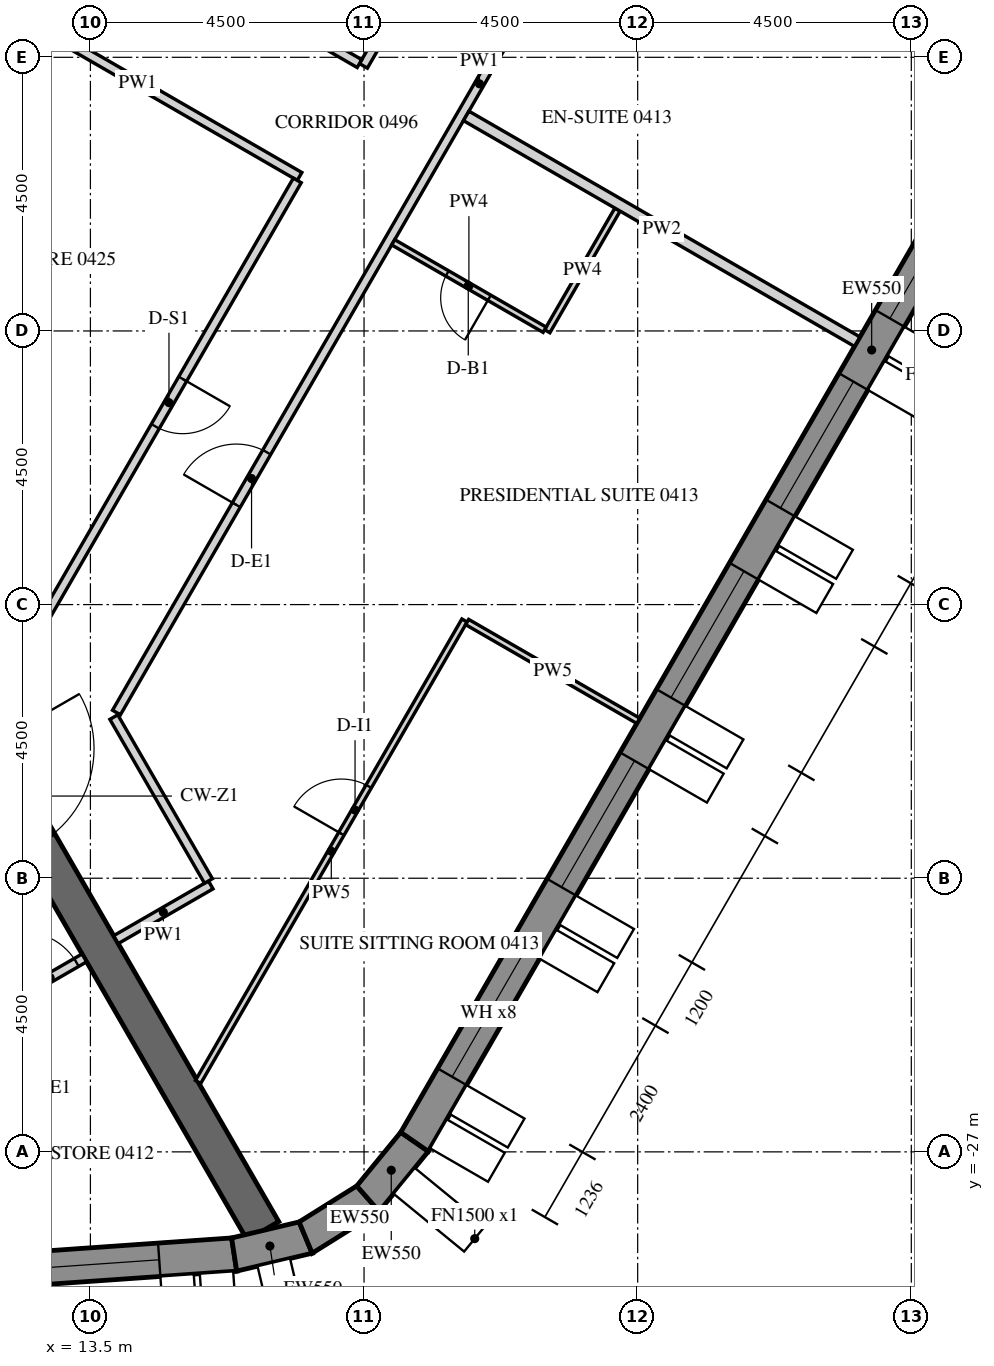
"""IFC4 building model, lengths in metres.
Left out: names, types, materials, properties, quantities, classifications, styles, units other than length and angle.
Written with IfcOpenShell. Run it as: python <this file> out.ifc"""

import sys

from ifc_helpers import new_model, si_unit, direction, frame, frame_2d, origin, place, context, subcontext, project, spatial, polyline, rectangle, outline, extrude, element, fill, save


model = new_model("IFC4")
c1 = context("Model", 3, precision=1e-05, world=origin(), true_north=direction((0.0, 1.0)))
c2 = subcontext(c1, "Body", "Model", "MODEL_VIEW")
j1 = project(units=[si_unit("LENGTHUNIT", "METRE"), si_unit("PLANEANGLEUNIT", "RADIAN")], contexts=[c1])
p1 = place(None, origin())
s1 = spatial("IfcSite", under=j1, at=p1, CompositionType="ELEMENT")
p2 = place(p1, origin())
s2 = spatial("IfcBuilding", under=s1, at=p2, CompositionType="ELEMENT")
p3 = place(p2, frame((0.0, 0.0, 68.7)))
s3 = spatial("IfcBuildingStorey", under=s2, at=p3, CompositionType="ELEMENT", Elevation=68.7)
p4 = place(p3, frame((-14.134, -30.786, -0.15), z_axis=(0.0, 0.0, 1.0), x_axis=(0.997564037441, 0.069756657061, 0.0)))
e1 = element("IfcWall", 1, at=p4, inside=s3, PredefinedType="SOLIDWALL", context=c2, shape_type="SweptSolid", body=[
    extrude(outline(polyline([(-0.026, -0.275), (30.094, -0.275), (30.049, 0.275), (0.026, 0.275), (-0.026, -0.275)])), origin(), (0.0, 0.0, 1.0), 3.9),
])
p5 = place(p4, frame((1.236, 0.0, 1.05)))
e2 = element("IfcOpeningElement", 2, at=p5, cuts=e1, PredefinedType="OPENING", context=c2, shape_type="SweptSolid", body=[
    extrude(rectangle(XDim=2.4, YDim=2.4, at=frame_2d((1.2, 1.2))), frame((0.0, 0.285, 0.0), z_axis=(0.0, -1.0, 0.0), x_axis=(1.0, 0.0, 0.0)), (0.0, 0.0, 1.0), 0.57),
])
p6 = place(p4, frame((4.835, 0.0, 1.05)))
e3 = element("IfcOpeningElement", 3, at=p6, cuts=e1, PredefinedType="OPENING", context=c2, shape_type="SweptSolid", body=[
    extrude(rectangle(XDim=2.4, YDim=2.4, at=frame_2d((1.2, 1.2))), frame((0.0, 0.285, 0.0), z_axis=(0.0, -1.0, 0.0), x_axis=(1.0, 0.0, 0.0)), (0.0, 0.0, 1.0), 0.57),
])
p7 = place(p4, frame((8.436, 0.0, 1.05)))
e4 = element("IfcOpeningElement", 4, at=p7, cuts=e1, PredefinedType="OPENING", context=c2, shape_type="SweptSolid", body=[
    extrude(rectangle(XDim=2.4, YDim=2.4, at=frame_2d((1.2, 1.2))), frame((0.0, 0.285, 0.0), z_axis=(0.0, -1.0, 0.0), x_axis=(1.0, 0.0, 0.0)), (0.0, 0.0, 1.0), 0.57),
])
p8 = place(p4, frame((12.035, 0.0, 1.05)))
e5 = element("IfcOpeningElement", 5, at=p8, cuts=e1, PredefinedType="OPENING", context=c2, shape_type="SweptSolid", body=[
    extrude(rectangle(XDim=2.4, YDim=2.4, at=frame_2d((1.2, 1.2))), frame((0.0, 0.285, 0.0), z_axis=(0.0, -1.0, 0.0), x_axis=(1.0, 0.0, 0.0)), (0.0, 0.0, 1.0), 0.57),
])
p9 = place(p4, frame((15.635, 0.0, 1.05)))
e6 = element("IfcOpeningElement", 6, at=p9, cuts=e1, PredefinedType="OPENING", context=c2, shape_type="SweptSolid", body=[
    extrude(rectangle(XDim=2.4, YDim=2.4, at=frame_2d((1.2, 1.2))), frame((0.0, 0.285, 0.0), z_axis=(0.0, -1.0, 0.0), x_axis=(1.0, 0.0, 0.0)), (0.0, 0.0, 1.0), 0.57),
])
p10 = place(p4, frame((19.236, 0.0, 1.05)))
e7 = element("IfcOpeningElement", 7, at=p10, cuts=e1, PredefinedType="OPENING", context=c2, shape_type="SweptSolid", body=[
    extrude(rectangle(XDim=2.4, YDim=2.4, at=frame_2d((1.2, 1.2))), frame((0.0, 0.285, 0.0), z_axis=(0.0, -1.0, 0.0), x_axis=(1.0, 0.0, 0.0)), (0.0, 0.0, 1.0), 0.57),
])
p11 = place(p4, frame((22.835, 0.0, 1.05)))
e8 = element("IfcOpeningElement", 8, at=p11, cuts=e1, PredefinedType="OPENING", context=c2, shape_type="SweptSolid", body=[
    extrude(rectangle(XDim=2.4, YDim=2.4, at=frame_2d((1.2, 1.2))), frame((0.0, 0.285, 0.0), z_axis=(0.0, -1.0, 0.0), x_axis=(1.0, 0.0, 0.0)), (0.0, 0.0, 1.0), 0.57),
])
p12 = place(p4, frame((26.436, 0.0, 1.05)))
e9 = element("IfcOpeningElement", 9, at=p12, cuts=e1, PredefinedType="OPENING", context=c2, shape_type="SweptSolid", body=[
    extrude(rectangle(XDim=2.4, YDim=2.4, at=frame_2d((1.2, 1.2))), frame((0.0, 0.285, 0.0), z_axis=(0.0, -1.0, 0.0), x_axis=(1.0, 0.0, 0.0)), (0.0, 0.0, 1.0), 0.57),
])
p13 = place(p3, frame((15.864, -28.688, -0.15), z_axis=(0.0, 0.0, 1.0), x_axis=(0.973063591128, 0.230536868247, 0.0)))
e10 = element("IfcWall", 10, at=p13, inside=s3, PredefinedType="SOLIDWALL", context=c2, shape_type="SweptSolid", body=[
    extrude(outline(polyline([(-0.022, -0.275), (1.253, -0.275), (1.163, 0.275), (0.022, 0.275), (-0.022, -0.275)])), origin(), (0.0, 0.0, 1.0), 3.9),
])
p14 = place(p3, frame((17.04, -28.41, -0.15), z_axis=(0.0, 0.0, 1.0), x_axis=(0.847952888306, 0.530071598195, 0.0)))
e11 = element("IfcWall", 11, at=p14, inside=s3, PredefinedType="SOLIDWALL", context=c2, shape_type="SweptSolid", body=[
    extrude(outline(polyline([(-0.045, -0.275), (1.253, -0.275), (1.163, 0.275), (0.045, 0.275), (-0.045, -0.275)])), origin(), (0.0, 0.0, 1.0), 3.9),
])
p15 = place(p3, frame((18.064, -27.769, -0.15), z_axis=(0.0, 0.0, 1.0), x_axis=(0.633842757806, 0.773461930787, 0.0)))
e12 = element("IfcWall", 12, at=p15, inside=s3, PredefinedType="SOLIDWALL", context=c2, shape_type="SweptSolid", body=[
    extrude(outline(polyline([(-0.045, -0.275), (1.231, -0.275), (1.186, 0.275), (0.045, 0.275), (-0.045, -0.275)])), origin(), (0.0, 0.0, 1.0), 3.9),
])
p16 = place(p3, frame((18.83, -26.835, -0.15), z_axis=(0.0, 0.0, 1.0), x_axis=(0.500003800416, 0.866023209602, 0.0)))
e13 = element("IfcWall", 13, at=p16, inside=s3, PredefinedType="SOLIDWALL", context=c2, shape_type="SweptSolid", body=[
    extrude(outline(polyline([(-0.022, -0.275), (30.097, -0.275), (30.045, 0.275), (0.022, 0.275), (-0.022, -0.275)])), origin(), (0.0, 0.0, 1.0), 3.9),
])
p17 = place(p16, frame((1.236, 0.0, 1.05)))
e14 = element("IfcOpeningElement", 14, at=p17, cuts=e13, PredefinedType="OPENING", context=c2, shape_type="SweptSolid", body=[
    extrude(rectangle(XDim=2.4, YDim=2.4, at=frame_2d((1.2, 1.2))), frame((0.0, 0.285, 0.0), z_axis=(0.0, -1.0, 0.0), x_axis=(1.0, 0.0, 0.0)), (0.0, 0.0, 1.0), 0.57),
])
p18 = place(p16, frame((4.835, 0.0, 1.05)))
e15 = element("IfcOpeningElement", 15, at=p18, cuts=e13, PredefinedType="OPENING", context=c2, shape_type="SweptSolid", body=[
    extrude(rectangle(XDim=2.4, YDim=2.4, at=frame_2d((1.2, 1.2))), frame((0.0, 0.285, 0.0), z_axis=(0.0, -1.0, 0.0), x_axis=(1.0, 0.0, 0.0)), (0.0, 0.0, 1.0), 0.57),
])
p19 = place(p16, frame((8.436, 0.0, 1.05)))
e16 = element("IfcOpeningElement", 16, at=p19, cuts=e13, PredefinedType="OPENING", context=c2, shape_type="SweptSolid", body=[
    extrude(rectangle(XDim=2.4, YDim=2.4, at=frame_2d((1.2, 1.2))), frame((0.0, 0.285, 0.0), z_axis=(0.0, -1.0, 0.0), x_axis=(1.0, 0.0, 0.0)), (0.0, 0.0, 1.0), 0.57),
])
p20 = place(p16, frame((12.035, 0.0, 1.05)))
e17 = element("IfcOpeningElement", 17, at=p20, cuts=e13, PredefinedType="OPENING", context=c2, shape_type="SweptSolid", body=[
    extrude(rectangle(XDim=2.4, YDim=2.4, at=frame_2d((1.2, 1.2))), frame((0.0, 0.285, 0.0), z_axis=(0.0, -1.0, 0.0), x_axis=(1.0, 0.0, 0.0)), (0.0, 0.0, 1.0), 0.57),
])
p21 = place(p16, frame((15.635, 0.0, 1.05)))
e18 = element("IfcOpeningElement", 18, at=p21, cuts=e13, PredefinedType="OPENING", context=c2, shape_type="SweptSolid", body=[
    extrude(rectangle(XDim=2.4, YDim=2.4, at=frame_2d((1.2, 1.2))), frame((0.0, 0.285, 0.0), z_axis=(0.0, -1.0, 0.0), x_axis=(1.0, 0.0, 0.0)), (0.0, 0.0, 1.0), 0.57),
])
p22 = place(p16, frame((19.236, 0.0, 1.05)))
e19 = element("IfcOpeningElement", 19, at=p22, cuts=e13, PredefinedType="OPENING", context=c2, shape_type="SweptSolid", body=[
    extrude(rectangle(XDim=2.4, YDim=2.4, at=frame_2d((1.2, 1.2))), frame((0.0, 0.285, 0.0), z_axis=(0.0, -1.0, 0.0), x_axis=(1.0, 0.0, 0.0)), (0.0, 0.0, 1.0), 0.57),
])
p23 = place(p16, frame((22.835, 0.0, 1.05)))
e20 = element("IfcOpeningElement", 20, at=p23, cuts=e13, PredefinedType="OPENING", context=c2, shape_type="SweptSolid", body=[
    extrude(rectangle(XDim=2.4, YDim=2.4, at=frame_2d((1.2, 1.2))), frame((0.0, 0.285, 0.0), z_axis=(0.0, -1.0, 0.0), x_axis=(1.0, 0.0, 0.0)), (0.0, 0.0, 1.0), 0.57),
])
p24 = place(p16, frame((26.436, 0.0, 1.05)))
e21 = element("IfcOpeningElement", 21, at=p24, cuts=e13, PredefinedType="OPENING", context=c2, shape_type="SweptSolid", body=[
    extrude(rectangle(XDim=2.4, YDim=2.4, at=frame_2d((1.2, 1.2))), frame((0.0, 0.285, 0.0), z_axis=(0.0, -1.0, 0.0), x_axis=(1.0, 0.0, 0.0)), (0.0, 0.0, 1.0), 0.57),
])
p25 = place(p3, frame((7.91, -13.7, -0.15), z_axis=(0.0, 0.0, 1.0), x_axis=(0.499999880136, 0.866025472988, 0.0)))
e22 = element("IfcWall", 22, at=p25, inside=s3, PredefinedType="SHEAR", context=c2, shape_type="SweptSolid", body=[
    extrude(outline(polyline([(-0.173, -0.3), (15.993, -0.3), (15.646, 0.3), (0.173, 0.3), (-0.173, -0.3)])), origin(), (0.0, 0.0, 1.0), 3.9),
])
p26 = place(p25, frame((7.039, 0.0, 0.15)))
e23 = element("IfcOpeningElement", 23, at=p26, cuts=e22, PredefinedType="OPENING", context=c2, shape_type="SweptSolid", body=[
    extrude(rectangle(XDim=1.8, YDim=2.4, at=frame_2d((0.9, 1.2))), frame((0.0, 0.31, 0.0), z_axis=(0.0, -1.0, 0.0), x_axis=(1.0, 0.0, 0.0)), (0.0, 0.0, 1.0), 0.62),
])
p27 = place(p3, frame((8.083, -14.0, -0.15), z_axis=(0.0, 0.0, 1.0), x_axis=(0.499997680643, -0.866026742862, 0.0)))
e24 = element("IfcWall", 24, at=p27, inside=s3, PredefinedType="SHEAR", context=c2, shape_type="SweptSolid", body=[
    extrude(rectangle(XDim=16.509, YDim=0.6, at=frame_2d((8.254, 0.0))), origin(), (0.0, 0.0, 1.0), 3.9),
])
p28 = place(p27, frame((7.354, 0.0, 0.15)))
e25 = element("IfcOpeningElement", 25, at=p28, cuts=e24, PredefinedType="OPENING", context=c2, shape_type="SweptSolid", body=[
    extrude(rectangle(XDim=1.8, YDim=2.4, at=frame_2d((0.9, 1.2))), frame((0.0, 0.31, 0.0), z_axis=(0.0, -1.0, 0.0), x_axis=(1.0, 0.0, 0.0)), (0.0, 0.0, 1.0), 0.62),
])
p29 = place(p3, frame((11.906, -24.673, 0.0), z_axis=(0.0, 0.0, 1.0), x_axis=(0.866013532718, 0.500020560727, 0.0)))
e26 = element("IfcWall", 26, at=p29, inside=s3, PredefinedType="PARTITIONING", context=c2, shape_type="SweptSolid", body=[
    extrude(rectangle(XDim=1.725, YDim=0.15, at=frame_2d((0.863, 0.0))), origin(), (0.0, 0.0, 1.0), 2.988),
])
p30 = place(p29, frame((0.575, 0.0, 0.0)))
e27 = element("IfcOpeningElement", 27, at=p30, cuts=e26, PredefinedType="OPENING", context=c2, shape_type="SweptSolid", body=[
    extrude(rectangle(XDim=1.0, YDim=2.1, at=frame_2d((0.5, 1.05))), frame((0.0, 0.085, 0.0), z_axis=(0.0, -1.0, 0.0), x_axis=(1.0, 0.0, 0.0)), (0.0, 0.0, 1.0), 0.17),
])
p31 = place(p3, frame((13.92, -23.51, 0.0), z_axis=(0.0, 0.0, 1.0), x_axis=(0.866047807691, 0.499961193289, 0.0)))
e28 = element("IfcWall", 28, at=p31, inside=s3, PredefinedType="PARTITIONING", context=c2, shape_type="SweptSolid", body=[
    extrude(rectangle(XDim=1.8, YDim=0.15, at=frame_2d((0.9, 0.0))), origin(), (0.0, 0.0, 1.0), 2.988),
])
p32 = place(p3, frame((15.441, -22.545, 0.0), z_axis=(0.0, 0.0, 1.0), x_axis=(-0.500037089193, 0.86600398927, 0.0)))
e29 = element("IfcWall", 29, at=p32, inside=s3, PredefinedType="PARTITIONING", context=c2, shape_type="SweptSolid", body=[
    extrude(rectangle(XDim=3.112, YDim=0.15, at=frame_2d((1.556, 0.0))), origin(), (0.0, 0.0, 1.0), 2.988),
])
p33 = place(p3, frame((13.928, -19.775, 0.0), z_axis=(0.0, 0.0, 1.0), x_axis=(0.50000450071, 0.866022805283, 0.0)))
e30 = element("IfcWall", 30, at=p33, inside=s3, PredefinedType="PARTITIONING", context=c2, shape_type="SweptSolid", body=[
    extrude(rectangle(XDim=23.877, YDim=0.15, at=frame_2d((11.938, 0.0))), origin(), (0.0, 0.0, 1.0), 2.988),
])
p34 = place(p33, frame((3.943, 0.0, 0.0)))
e31 = element("IfcOpeningElement", 31, at=p34, cuts=e30, PredefinedType="OPENING", context=c2, shape_type="SweptSolid", body=[
    extrude(rectangle(XDim=1.0, YDim=2.1, at=frame_2d((0.5, 1.05))), frame((0.0, 0.085, 0.0), z_axis=(0.0, -1.0, 0.0), x_axis=(1.0, 0.0, 0.0)), (0.0, 0.0, 1.0), 0.17),
])
p35 = place(p33, frame((14.972, 0.0, 0.0)))
e32 = element("IfcOpeningElement", 32, at=p35, cuts=e30, PredefinedType="OPENING", context=c2, shape_type="SweptSolid", body=[
    extrude(rectangle(XDim=1.0, YDim=2.1, at=frame_2d((0.5, 1.05))), frame((0.0, 0.085, 0.0), z_axis=(0.0, -1.0, 0.0), x_axis=(1.0, 0.0, 0.0)), (0.0, 0.0, 1.0), 0.17),
])
p36 = place(p3, frame((23.704, 0.757, 0.0), z_axis=(0.0, 0.0, 1.0), x_axis=(-0.500010297365, -0.866019458516, 0.0)))
e33 = element("IfcWall", 33, at=p36, inside=s3, PredefinedType="PARTITIONING", context=c2, shape_type="SweptSolid", body=[
    extrude(rectangle(XDim=11.429, YDim=0.15, at=frame_2d((5.714, 0.0))), origin(), (0.0, 0.0, 1.0), 2.988),
])
p37 = place(p36, frame((5.264, 0.0, 0.0)))
e34 = element("IfcOpeningElement", 34, at=p37, cuts=e33, PredefinedType="OPENING", context=c2, shape_type="SweptSolid", body=[
    extrude(rectangle(XDim=0.9, YDim=2.1, at=frame_2d((0.45, 1.05))), frame((0.0, 0.085, 0.0), z_axis=(0.0, -1.0, 0.0), x_axis=(1.0, 0.0, 0.0)), (0.0, 0.0, 1.0), 0.17),
])
p38 = place(p3, frame((17.925, -9.103, 0.0), z_axis=(0.0, 0.0, 1.0), x_axis=(-0.866013586754, 0.500020467139, 0.0)))
e35 = element("IfcWall", 35, at=p38, inside=s3, PredefinedType="PARTITIONING", context=c2, shape_type="SweptSolid", body=[
    extrude(rectangle(XDim=6.075, YDim=0.15, at=frame_2d((3.038, 0.0))), origin(), (0.0, 0.0, 1.0), 2.988),
])
p39 = place(p3, frame((11.614, -7.884, 0.0), z_axis=(0.0, 0.0, 1.0), x_axis=(0.866033542371, -0.499985903289, 0.0)))
e36 = element("IfcWall", 36, at=p39, inside=s3, PredefinedType="PARTITIONING", context=c2, shape_type="SweptSolid", body=[
    extrude(rectangle(XDim=6.15, YDim=0.15, at=frame_2d((3.075, 0.0))), origin(), (0.0, 0.0, 1.0), 2.988),
])
p40 = place(p3, frame((16.902, -11.024, 0.0), z_axis=(0.0, 0.0, 1.0), x_axis=(-0.499999527968, -0.866025676312, 0.0)))
e37 = element("IfcWall", 37, at=p40, inside=s3, PredefinedType="PARTITIONING", context=c2, shape_type="SweptSolid", body=[
    extrude(rectangle(XDim=8.441, YDim=0.15, at=frame_2d((4.22, 0.0))), origin(), (0.0, 0.0, 1.0), 2.988),
])
p41 = place(p40, frame((3.771, 0.0, 0.0)))
e38 = element("IfcOpeningElement", 38, at=p41, cuts=e37, PredefinedType="OPENING", context=c2, shape_type="SweptSolid", body=[
    extrude(rectangle(XDim=0.9, YDim=2.1, at=frame_2d((0.45, 1.05))), frame((0.0, 0.085, 0.0), z_axis=(0.0, -1.0, 0.0), x_axis=(1.0, 0.0, 0.0)), (0.0, 0.0, 1.0), 0.17),
])
p42 = place(p3, frame((22.168, -11.504, 0.0), z_axis=(0.0, 0.0, 1.0), x_axis=(-0.500015210774, -0.866016621662, 0.0)))
e39 = element("IfcWall", 39, at=p42, inside=s3, PredefinedType="PARTITIONING", context=c2, shape_type="SweptSolid", body=[
    extrude(rectangle(XDim=2.31, YDim=0.1, at=frame_2d((1.155, 0.0))), origin(), (0.0, 0.0, 1.0), 2.988),
])
p43 = place(p3, frame((20.969, -13.48, 0.0), z_axis=(0.0, 0.0, 1.0), x_axis=(-0.866018712932, 0.500011588718, 0.0)))
e40 = element("IfcWall", 40, at=p43, inside=s3, PredefinedType="PARTITIONING", context=c2, shape_type="SweptSolid", body=[
    extrude(rectangle(XDim=2.875, YDim=0.1, at=frame_2d((1.438, 0.0))), origin(), (0.0, 0.0, 1.0), 2.988),
])
p44 = place(p43, frame((1.05, 0.0, 0.0)))
e41 = element("IfcOpeningElement", 41, at=p44, cuts=e40, PredefinedType="OPENING", context=c2, shape_type="SweptSolid", body=[
    extrude(rectangle(XDim=0.8, YDim=2.1, at=frame_2d((0.4, 1.05))), frame((0.0, 0.06, 0.0), z_axis=(0.0, -1.0, 0.0), x_axis=(1.0, 0.0, 0.0)), (0.0, 0.0, 1.0), 0.12),
])
p45 = place(p3, frame((15.271, -25.85, 0.0), z_axis=(0.0, 0.0, 1.0), x_axis=(0.499983733712, 0.866034794927, 0.0)))
e42 = element("IfcWall", 42, at=p45, inside=s3, PredefinedType="PARTITIONING", context=c2, shape_type="SweptSolid", body=[
    extrude(rectangle(XDim=8.762, YDim=0.1, at=frame_2d((4.381, 0.0))), origin(), (0.0, 0.0, 1.0), 2.988),
])
p46 = place(p45, frame((4.712, 0.0, 0.0)))
e43 = element("IfcOpeningElement", 43, at=p46, cuts=e42, PredefinedType="OPENING", context=c2, shape_type="SweptSolid", body=[
    extrude(rectangle(XDim=0.9, YDim=2.1, at=frame_2d((0.45, 1.05))), frame((0.0, 0.06, 0.0), z_axis=(0.0, -1.0, 0.0), x_axis=(1.0, 0.0, 0.0)), (0.0, 0.0, 1.0), 0.12),
])
p47 = place(p3, frame((19.695, -18.287, 0.0), z_axis=(0.0, 0.0, 1.0), x_axis=(0.866034226713, -0.499984717929, 0.0)))
e44 = element("IfcWall", 44, at=p47, inside=s3, PredefinedType="PARTITIONING", context=c2, shape_type="SweptSolid", body=[
    extrude(rectangle(XDim=3.25, YDim=0.1, at=frame_2d((1.625, 0.0))), origin(), (0.0, 0.0, 1.0), 2.988),
])
p48 = place(p3, frame((26.11, -13.676, 0.0), z_axis=(0.0, 0.0, 1.0), x_axis=(-0.866014745021, 0.500018461065, 0.0)))
e45 = element("IfcWall", 45, at=p48, inside=s3, PredefinedType="PARTITIONING", context=c2, shape_type="SweptSolid", body=[
    extrude(rectangle(XDim=7.425, YDim=0.18, at=frame_2d((3.712, 0.0))), origin(), (0.0, 0.0, 1.0), 2.988),
])
p49 = place(p12, frame((0.0, 0.205, 0.0)))
e46 = element("IfcWindow", 46, at=p49, inside=s3, PartitioningType="DOUBLE_PANEL_VERTICAL", PredefinedType="WINDOW", context=c2, shape_type="SweptSolid", body=[
    extrude(rectangle(XDim=2.4, YDim=2.4, at=frame_2d((1.2, 1.2))), frame((0.0, 0.03, 0.0), z_axis=(0.0, -1.0, 0.0), x_axis=(1.0, 0.0, 0.0)), (0.0, 0.0, 1.0), 0.06),
])
fill(e9, e46)
p50 = place(p17, frame((0.0, 0.205, 0.0)))
e47 = element("IfcWindow", 47, at=p50, inside=s3, PartitioningType="DOUBLE_PANEL_VERTICAL", PredefinedType="WINDOW", context=c2, shape_type="SweptSolid", body=[
    extrude(rectangle(XDim=2.4, YDim=2.4, at=frame_2d((1.2, 1.2))), frame((0.0, 0.03, 0.0), z_axis=(0.0, -1.0, 0.0), x_axis=(1.0, 0.0, 0.0)), (0.0, 0.0, 1.0), 0.06),
])
fill(e14, e47)
p51 = place(p18, frame((0.0, 0.205, 0.0)))
e48 = element("IfcWindow", 48, at=p51, inside=s3, PartitioningType="DOUBLE_PANEL_VERTICAL", PredefinedType="WINDOW", context=c2, shape_type="SweptSolid", body=[
    extrude(rectangle(XDim=2.4, YDim=2.4, at=frame_2d((1.2, 1.2))), frame((0.0, 0.03, 0.0), z_axis=(0.0, -1.0, 0.0), x_axis=(1.0, 0.0, 0.0)), (0.0, 0.0, 1.0), 0.06),
])
fill(e15, e48)
p52 = place(p19, frame((0.0, 0.205, 0.0)))
e49 = element("IfcWindow", 49, at=p52, inside=s3, PartitioningType="DOUBLE_PANEL_VERTICAL", PredefinedType="WINDOW", context=c2, shape_type="SweptSolid", body=[
    extrude(rectangle(XDim=2.4, YDim=2.4, at=frame_2d((1.2, 1.2))), frame((0.0, 0.03, 0.0), z_axis=(0.0, -1.0, 0.0), x_axis=(1.0, 0.0, 0.0)), (0.0, 0.0, 1.0), 0.06),
])
fill(e16, e49)
p53 = place(p20, frame((0.0, 0.205, 0.0)))
e50 = element("IfcWindow", 50, at=p53, inside=s3, PartitioningType="DOUBLE_PANEL_VERTICAL", PredefinedType="WINDOW", context=c2, shape_type="SweptSolid", body=[
    extrude(rectangle(XDim=2.4, YDim=2.4, at=frame_2d((1.2, 1.2))), frame((0.0, 0.03, 0.0), z_axis=(0.0, -1.0, 0.0), x_axis=(1.0, 0.0, 0.0)), (0.0, 0.0, 1.0), 0.06),
])
fill(e17, e50)
p54 = place(p21, frame((0.0, 0.205, 0.0)))
e51 = element("IfcWindow", 51, at=p54, inside=s3, PartitioningType="DOUBLE_PANEL_VERTICAL", PredefinedType="WINDOW", context=c2, shape_type="SweptSolid", body=[
    extrude(rectangle(XDim=2.4, YDim=2.4, at=frame_2d((1.2, 1.2))), frame((0.0, 0.03, 0.0), z_axis=(0.0, -1.0, 0.0), x_axis=(1.0, 0.0, 0.0)), (0.0, 0.0, 1.0), 0.06),
])
fill(e18, e51)
p55 = place(p30, origin())
e52 = element("IfcDoor", 52, at=p55, inside=s3, OperationType="SINGLE_SWING_LEFT", PredefinedType="DOOR", context=c2, shape_type="SweptSolid", body=[
    extrude(rectangle(XDim=1.0, YDim=2.1, at=frame_2d((0.5, 1.05))), frame((0.0, 0.025, 0.0), z_axis=(0.0, -1.0, 0.0), x_axis=(1.0, 0.0, 0.0)), (0.0, 0.0, 1.0), 0.05),
])
fill(e27, e52)
p56 = place(p34, origin())
e53 = element("IfcDoor", 53, at=p56, inside=s3, OperationType="SINGLE_SWING_RIGHT", PredefinedType="DOOR", context=c2, shape_type="SweptSolid", body=[
    extrude(rectangle(XDim=1.0, YDim=2.1, at=frame_2d((0.5, 1.05))), frame((0.0, 0.025, 0.0), z_axis=(0.0, -1.0, 0.0), x_axis=(1.0, 0.0, 0.0)), (0.0, 0.0, 1.0), 0.05),
])
fill(e31, e53)
p57 = place(p44, origin())
e54 = element("IfcDoor", 54, at=p57, inside=s3, OperationType="SINGLE_SWING_RIGHT", PredefinedType="DOOR", context=c2, shape_type="SweptSolid", body=[
    extrude(rectangle(XDim=0.8, YDim=2.1, at=frame_2d((0.4, 1.05))), frame((0.0, 0.025, 0.0), z_axis=(0.0, -1.0, 0.0), x_axis=(1.0, 0.0, 0.0)), (0.0, 0.0, 1.0), 0.05),
])
fill(e41, e54)
p58 = place(p46, origin())
e55 = element("IfcDoor", 55, at=p58, inside=s3, OperationType="SINGLE_SWING_LEFT", PredefinedType="DOOR", context=c2, shape_type="SweptSolid", body=[
    extrude(rectangle(XDim=0.9, YDim=2.1, at=frame_2d((0.45, 1.05))), frame((0.0, 0.025, 0.0), z_axis=(0.0, -1.0, 0.0), x_axis=(1.0, 0.0, 0.0)), (0.0, 0.0, 1.0), 0.05),
])
fill(e43, e55)
p59 = place(p41, origin())
e56 = element("IfcDoor", 56, at=p59, inside=s3, OperationType="SINGLE_SWING_RIGHT", PredefinedType="DOOR", context=c2, shape_type="SweptSolid", body=[
    extrude(rectangle(XDim=0.9, YDim=2.1, at=frame_2d((0.45, 1.05))), frame((0.0, 0.025, 0.0), z_axis=(0.0, -1.0, 0.0), x_axis=(1.0, 0.0, 0.0)), (0.0, 0.0, 1.0), 0.05),
])
fill(e38, e56)
save(model, sys.argv[1])
